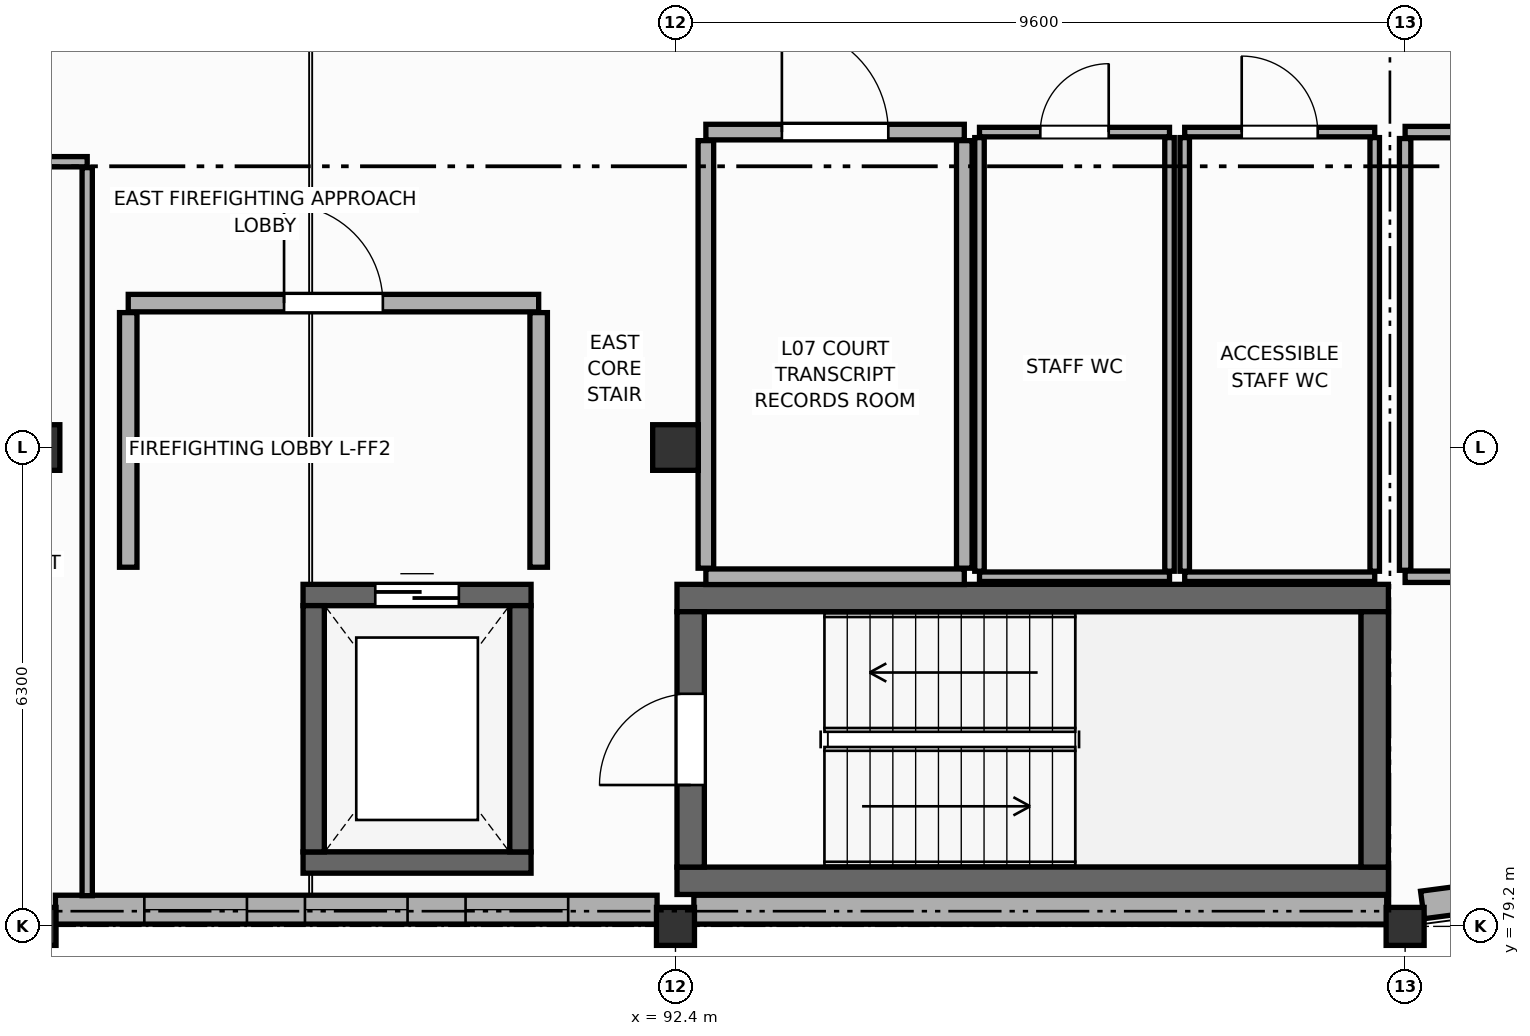
"""IFC4 building model, lengths in metres.
Left out: names, types, materials, properties, quantities, classifications, styles, units other than length and angle.
Written with IfcOpenShell. Run it as: python <this file> out.ifc"""

import sys

from ifc_helpers import new_model, si_unit, direction, frame, frame_2d, origin, origin_2d, place, context, subcontext, project, spatial, rectangle, extrude, element, fill, save


model = new_model("IFC4")
c1 = context("Model", 3, precision=1e-05, world=origin(), true_north=direction((0.0, 1.0)))
c2 = subcontext(c1, "Body", "Model", "MODEL_VIEW")
j1 = project(units=[si_unit("LENGTHUNIT", "METRE"), si_unit("PLANEANGLEUNIT", "RADIAN")], contexts=[c1])
p1 = place(None, origin())
s1 = spatial("IfcSite", under=j1, at=p1, CompositionType="ELEMENT")
p2 = place(p1, origin())
s2 = spatial("IfcBuilding", under=s1, at=p2, CompositionType="ELEMENT")
p3 = place(p2, frame((0.0, 0.0, 27.0)))
s3 = spatial("IfcBuildingStorey", under=s2, at=p3, CompositionType="ELEMENT", Elevation=27.0)
p4 = place(p3, frame((84.0, 79.2, 0.0), z_axis=(0.0, 0.0, 1.0), x_axis=(1.0, 0.0, 0.0)))
e1 = element("IfcColumn", 1, at=p4, inside=s3, PredefinedType="COLUMN", context=c2, shape_type="SweptSolid", body=[
    extrude(rectangle(XDim=0.5, YDim=0.5, at=origin_2d()), origin(), (0.0, 0.0, 1.0), 4.2),
])
p5 = place(p3, frame((84.0, 85.5, 0.0), z_axis=(0.0, 0.0, 1.0), x_axis=(1.0, 0.0, 0.0)))
e2 = element("IfcColumn", 2, at=p5, inside=s3, PredefinedType="COLUMN", context=c2, shape_type="SweptSolid", body=[
    extrude(rectangle(XDim=0.6, YDim=0.6, at=origin_2d()), origin(), (0.0, 0.0, 1.0), 4.2),
])
p6 = place(p3, frame((92.4, 79.2, 0.0), z_axis=(0.0, 0.0, 1.0), x_axis=(1.0, 0.0, 0.0)))
e3 = element("IfcColumn", 3, at=p6, inside=s3, PredefinedType="COLUMN", context=c2, shape_type="SweptSolid", body=[
    extrude(rectangle(XDim=0.5, YDim=0.5, at=origin_2d()), origin(), (0.0, 0.0, 1.0), 4.2),
])
p7 = place(p3, frame((92.4, 85.5, 0.0), z_axis=(0.0, 0.0, 1.0), x_axis=(1.0, 0.0, 0.0)))
e4 = element("IfcColumn", 4, at=p7, inside=s3, PredefinedType="COLUMN", context=c2, shape_type="SweptSolid", body=[
    extrude(rectangle(XDim=0.6, YDim=0.6, at=origin_2d()), origin(), (0.0, 0.0, 1.0), 4.2),
])
p8 = place(p3, frame((102.0, 79.2, 0.0), z_axis=(0.0, 0.0, 1.0), x_axis=(1.0, 0.0, 0.0)))
e5 = element("IfcColumn", 5, at=p8, inside=s3, PredefinedType="COLUMN", context=c2, shape_type="SweptSolid", body=[
    extrude(rectangle(XDim=0.5, YDim=0.5, at=origin_2d()), origin(), (0.0, 0.0, 1.0), 4.2),
])
p9 = place(p3, frame((92.158, 79.42, 0.0), z_axis=(0.0, 0.0, 1.0), x_axis=(-1.0, 0.0, 0.0)))
e6 = element("IfcWall", 6, at=p9, inside=s3, PredefinedType="STANDARD", context=c2, shape_type="SweptSolid", body=[
    extrude(rectangle(XDim=7.916, YDim=0.38, at=frame_2d((3.958, 0.0))), origin(), (0.0, 0.0, 1.0), 3.51),
])
p10 = place(p9, frame((1.17, 0.0, 0.85)))
e7 = element("IfcOpeningElement", 7, at=p10, cuts=e6, PredefinedType="OPENING", context=c2, shape_type="SweptSolid", body=[
    extrude(rectangle(XDim=1.35, YDim=1.95, at=frame_2d((0.675, 0.975))), frame((0.0, 0.2, 0.0), z_axis=(0.0, -1.0, 0.0), x_axis=(1.0, 0.0, 0.0)), (0.0, 0.0, 1.0), 0.4),
])
p11 = place(p9, frame((3.283, 0.0, 0.85)))
e8 = element("IfcOpeningElement", 8, at=p11, cuts=e6, PredefinedType="OPENING", context=c2, shape_type="SweptSolid", body=[
    extrude(rectangle(XDim=1.35, YDim=1.95, at=frame_2d((0.675, 0.975))), frame((0.0, 0.2, 0.0), z_axis=(0.0, -1.0, 0.0), x_axis=(1.0, 0.0, 0.0)), (0.0, 0.0, 1.0), 0.4),
])
p12 = place(p9, frame((5.396, 0.0, 0.85)))
e9 = element("IfcOpeningElement", 9, at=p12, cuts=e6, PredefinedType="OPENING", context=c2, shape_type="SweptSolid", body=[
    extrude(rectangle(XDim=1.35, YDim=1.95, at=frame_2d((0.675, 0.975))), frame((0.0, 0.2, 0.0), z_axis=(0.0, -1.0, 0.0), x_axis=(1.0, 0.0, 0.0)), (0.0, 0.0, 1.0), 0.4),
])
p13 = place(p3, frame((101.758, 79.42, 0.0), z_axis=(0.0, 0.0, 1.0), x_axis=(-1.0, 0.0, 0.0)))
e10 = element("IfcWall", 10, at=p13, inside=s3, PredefinedType="STANDARD", context=c2, shape_type="SweptSolid", body=[
    extrude(rectangle(XDim=9.116, YDim=0.38, at=frame_2d((4.558, 0.0))), origin(), (0.0, 0.0, 1.0), 3.11),
])
p14 = place(p3, frame((102.227, 79.482, 0.0), z_axis=(0.0, 0.0, 1.0), x_axis=(0.991440016295, 0.130562988969, 0.0)))
e11 = element("IfcWall", 11, at=p14, inside=s3, PredefinedType="ELEMENTEDWALL", context=c2, shape_type="SweptSolid", body=[
    extrude(rectangle(XDim=3.027, YDim=0.365, at=frame_2d((1.514, 0.0))), origin(), (0.0, 0.0, 1.0), 3.11),
])
p15 = place(p14, frame((1.128, 0.0, 0.85)))
e12 = element("IfcOpeningElement", 12, at=p15, cuts=e11, PredefinedType="OPENING", context=c2, shape_type="SweptSolid", body=[
    extrude(rectangle(XDim=0.8, YDim=1.7, at=frame_2d((0.4, 0.85))), frame((0.0, 0.192, 0.0), z_axis=(0.0, -1.0, 0.0), x_axis=(1.0, 0.0, 0.0)), (0.0, 0.0, 1.0), 0.385),
])
for number, where, z_axis, x_axis in (
    (13, (92.42, 83.52, 0.0), (0.0, 0.0, 1.0), (1.0, 0.0, 0.0)),
    (14, (101.78, 79.8, 0.0), (0.0, 0.0, 1.0), (-1.0, 0.0, 0.0)),
):
    element("IfcWall", number, at=place(p3, frame(where, z_axis=z_axis, x_axis=x_axis)), inside=s3, PredefinedType="SHEAR", context=c2, shape_type="SweptSolid", body=[
        extrude(rectangle(XDim=9.36, YDim=0.36, at=frame_2d((4.68, 0.0))), origin(), (0.0, 0.0, 1.0), 3.98),
    ])
p16 = place(p3, frame((92.6, 79.98, 0.0), z_axis=(0.0, 0.0, 1.0), x_axis=(0.0, 1.0, 0.0)))
e15 = element("IfcWall", 15, at=p16, inside=s3, PredefinedType="SHEAR", context=c2, shape_type="SweptSolid", body=[
    extrude(rectangle(XDim=3.36, YDim=0.36, at=frame_2d((1.68, 0.0))), origin(), (0.0, 0.0, 1.0), 3.98),
])
p17 = place(p16, frame((1.08, 0.0, 0.0)))
e16 = element("IfcOpeningElement", 16, at=p17, cuts=e15, PredefinedType="OPENING", context=c2, shape_type="SweptSolid", body=[
    extrude(rectangle(XDim=1.2, YDim=2.2, at=frame_2d((0.6, 1.1))), frame((0.0, 0.19, 0.0), z_axis=(0.0, -1.0, 0.0), x_axis=(1.0, 0.0, 0.0)), (0.0, 0.0, 1.0), 0.38),
])
p18 = place(p3, frame((101.6, 83.34, 0.0), z_axis=(0.0, 0.0, 1.0), x_axis=(0.0, -1.0, 0.0)))
e17 = element("IfcWall", 17, at=p18, inside=s3, PredefinedType="SHEAR", context=c2, shape_type="SweptSolid", body=[
    extrude(rectangle(XDim=3.36, YDim=0.36, at=frame_2d((1.68, 0.0))), origin(), (0.0, 0.0, 1.0), 3.98),
])
p19 = place(p3, frame((87.5, 83.56, 0.0), z_axis=(0.0, 0.0, 1.0), x_axis=(1.0, 0.0, 0.0)))
e18 = element("IfcWall", 18, at=p19, inside=s3, PredefinedType="SHEAR", context=c2, shape_type="SweptSolid", body=[
    extrude(rectangle(XDim=3.0, YDim=0.28, at=frame_2d((1.5, 0.0))), origin(), (0.0, 0.0, 1.0), 3.98),
])
p20 = place(p19, frame((0.95, 0.0, 0.0)))
e19 = element("IfcOpeningElement", 19, at=p20, cuts=e18, PredefinedType="OPENING", context=c2, shape_type="SweptSolid", body=[
    extrude(rectangle(XDim=1.1, YDim=2.2, at=frame_2d((0.55, 1.1))), frame((0.0, 0.15, 0.0), z_axis=(0.0, -1.0, 0.0), x_axis=(1.0, 0.0, 0.0)), (0.0, 0.0, 1.0), 0.3),
])
p21 = place(p3, frame((90.5, 80.04, 0.0), z_axis=(0.0, 0.0, 1.0), x_axis=(-1.0, 0.0, 0.0)))
e20 = element("IfcWall", 20, at=p21, inside=s3, PredefinedType="SHEAR", context=c2, shape_type="SweptSolid", body=[
    extrude(rectangle(XDim=3.0, YDim=0.28, at=frame_2d((1.5, 0.0))), origin(), (0.0, 0.0, 1.0), 3.98),
])
for number, where, z_axis, x_axis in (
    (21, (87.64, 80.18, 0.0), (0.0, 0.0, 1.0), (0.0, 1.0, 0.0)),
    (22, (90.36, 83.42, 0.0), (0.0, 0.0, 1.0), (0.0, -1.0, 0.0)),
):
    element("IfcWall", number, at=place(p3, frame(where, z_axis=z_axis, x_axis=x_axis)), inside=s3, PredefinedType="SHEAR", context=c2, shape_type="SweptSolid", body=[
        extrude(rectangle(XDim=3.24, YDim=0.28, at=frame_2d((1.62, 0.0))), origin(), (0.0, 0.0, 1.0), 3.98),
    ])
p22 = place(p3, frame((85.2, 87.4, 0.0), z_axis=(0.0, 0.0, 1.0), x_axis=(1.0, 0.0, 0.0)))
e23 = element("IfcWall", 23, at=p22, inside=s3, PredefinedType="STANDARD", context=c2, shape_type="SweptSolid", body=[
    extrude(rectangle(XDim=5.4, YDim=0.23, at=frame_2d((2.7, 0.0))), origin(), (0.0, 0.0, 1.0), 3.965),
])
p23 = place(p22, frame((2.05, 0.0, 0.0)))
e24 = element("IfcOpeningElement", 24, at=p23, cuts=e23, PredefinedType="OPENING", context=c2, shape_type="SweptSolid", body=[
    extrude(rectangle(XDim=1.3, YDim=2.2, at=frame_2d((0.65, 1.1))), frame((0.0, 0.125, 0.0), z_axis=(0.0, -1.0, 0.0), x_axis=(1.0, 0.0, 0.0)), (0.0, 0.0, 1.0), 0.25),
])
for number, where, z_axis, x_axis in (
    (25, (85.2, 83.925, 0.0), (0.0, 0.0, 1.0), (0.0, 1.0, 0.0)),
    (26, (90.6, 87.275, 0.0), (0.0, 0.0, 1.0), (0.0, -1.0, 0.0)),
):
    element("IfcWall", number, at=place(p3, frame(where, z_axis=z_axis, x_axis=x_axis)), inside=s3, PredefinedType="STANDARD", context=c2, shape_type="SweptSolid", body=[
        extrude(rectangle(XDim=3.35, YDim=0.23, at=frame_2d((1.675, 0.0))), origin(), (0.0, 0.0, 1.0), 3.41),
    ])
p24 = place(p3, frame((96.4, 89.65, 0.0), z_axis=(0.0, 0.0, 1.0), x_axis=(1.0, 0.0, 0.0)))
e27 = element("IfcWall", 27, at=p24, inside=s3, PredefinedType="PARTITIONING", context=c2, shape_type="SweptSolid", body=[
    extrude(rectangle(XDim=2.5, YDim=0.125, at=frame_2d((1.25, 0.0))), origin(), (0.0, 0.0, 1.0), 3.965),
])
p25 = place(p24, frame((0.8, 0.0, 0.0)))
e28 = element("IfcOpeningElement", 28, at=p25, cuts=e27, PredefinedType="OPENING", context=c2, shape_type="SweptSolid", body=[
    extrude(rectangle(XDim=0.9, YDim=2.1, at=frame_2d((0.45, 1.05))), frame((0.0, 0.073, 0.0), z_axis=(0.0, -1.0, 0.0), x_axis=(1.0, 0.0, 0.0)), (0.0, 0.0, 1.0), 0.145),
])
p26 = place(p3, frame((98.9, 83.8, 0.0), z_axis=(0.0, 0.0, 1.0), x_axis=(-1.0, 0.0, 0.0)))
e29 = element("IfcWall", 29, at=p26, inside=s3, PredefinedType="PARTITIONING", context=c2, shape_type="SweptSolid", body=[
    extrude(rectangle(XDim=2.5, YDim=0.125, at=frame_2d((1.25, 0.0))), origin(), (0.0, 0.0, 1.0), 3.965),
])
for number, where, z_axis, x_axis in (
    (30, (96.4, 83.873, 0.0), (0.0, 0.0, 1.0), (0.0, 1.0, 0.0)),
    (31, (98.9, 89.577, 0.0), (0.0, 0.0, 1.0), (0.0, -1.0, 0.0)),
):
    element("IfcWall", number, at=place(p3, frame(where, z_axis=z_axis, x_axis=x_axis)), inside=s3, PredefinedType="PARTITIONING", context=c2, shape_type="SweptSolid", body=[
        extrude(rectangle(XDim=5.705, YDim=0.125, at=frame_2d((2.853, 0.0))), origin(), (0.0, 0.0, 1.0), 3.965),
    ])
p27 = place(p3, frame((99.1, 89.65, 0.0), z_axis=(0.0, 0.0, 1.0), x_axis=(1.0, 0.0, 0.0)))
e32 = element("IfcWall", 32, at=p27, inside=s3, PredefinedType="PARTITIONING", context=c2, shape_type="SweptSolid", body=[
    extrude(rectangle(XDim=2.5, YDim=0.125, at=frame_2d((1.25, 0.0))), origin(), (0.0, 0.0, 1.0), 3.11),
])
p28 = place(p27, frame((0.75, 0.0, 0.0)))
e33 = element("IfcOpeningElement", 33, at=p28, cuts=e32, PredefinedType="OPENING", context=c2, shape_type="SweptSolid", body=[
    extrude(rectangle(XDim=1.0, YDim=2.1, at=frame_2d((0.5, 1.05))), frame((0.0, 0.073, 0.0), z_axis=(0.0, -1.0, 0.0), x_axis=(1.0, 0.0, 0.0)), (0.0, 0.0, 1.0), 0.145),
])
p29 = place(p3, frame((101.6, 83.8, 0.0), z_axis=(0.0, 0.0, 1.0), x_axis=(-1.0, 0.0, 0.0)))
e34 = element("IfcWall", 34, at=p29, inside=s3, PredefinedType="PARTITIONING", context=c2, shape_type="SweptSolid", body=[
    extrude(rectangle(XDim=2.5, YDim=0.125, at=frame_2d((1.25, 0.0))), origin(), (0.0, 0.0, 1.0), 3.11),
])
p30 = place(p3, frame((99.1, 83.873, 0.0), z_axis=(0.0, 0.0, 1.0), x_axis=(0.0, 1.0, 0.0)))
e35 = element("IfcWall", 35, at=p30, inside=s3, PredefinedType="PARTITIONING", context=c2, shape_type="SweptSolid", body=[
    extrude(rectangle(XDim=5.705, YDim=0.125, at=frame_2d((2.853, 0.0))), origin(), (0.0, 0.0, 1.0), 3.965),
])
p31 = place(p3, frame((101.6, 89.577, 0.0), z_axis=(0.0, 0.0, 1.0), x_axis=(0.0, -1.0, 0.0)))
e36 = element("IfcWall", 36, at=p31, inside=s3, PredefinedType="PARTITIONING", context=c2, shape_type="SweptSolid", body=[
    extrude(rectangle(XDim=5.705, YDim=0.125, at=frame_2d((2.853, 0.0))), origin(), (0.0, 0.0, 1.0), 3.11),
])
p32 = place(p3, frame((92.8, 89.65, 0.0), z_axis=(0.0, 0.0, 1.0), x_axis=(1.0, 0.0, 0.0)))
e37 = element("IfcWall", 37, at=p32, inside=s3, PredefinedType="STANDARD", context=c2, shape_type="SweptSolid", body=[
    extrude(rectangle(XDim=3.4, YDim=0.205, at=frame_2d((1.7, 0.0))), origin(), (0.0, 0.0, 1.0), 3.965),
])
p33 = place(p32, frame((1.0, 0.0, 0.0)))
e38 = element("IfcOpeningElement", 38, at=p33, cuts=e37, PredefinedType="OPENING", context=c2, shape_type="SweptSolid", body=[
    extrude(rectangle(XDim=1.4, YDim=2.25, at=frame_2d((0.7, 1.125))), frame((0.0, 0.113, 0.0), z_axis=(0.0, -1.0, 0.0), x_axis=(1.0, 0.0, 0.0)), (0.0, 0.0, 1.0), 0.225),
])
p34 = place(p3, frame((96.2, 83.8, 0.0), z_axis=(0.0, 0.0, 1.0), x_axis=(-1.0, 0.0, 0.0)))
e39 = element("IfcWall", 39, at=p34, inside=s3, PredefinedType="STANDARD", context=c2, shape_type="SweptSolid", body=[
    extrude(rectangle(XDim=3.4, YDim=0.205, at=frame_2d((1.7, 0.0))), origin(), (0.0, 0.0, 1.0), 3.965),
])
for number, where, z_axis, x_axis in (
    (40, (92.8, 83.913, 0.0), (0.0, 0.0, 1.0), (0.0, 1.0, 0.0)),
    (41, (96.2, 89.538, 0.0), (0.0, 0.0, 1.0), (0.0, -1.0, 0.0)),
):
    element("IfcWall", number, at=place(p3, frame(where, z_axis=z_axis, x_axis=x_axis)), inside=s3, PredefinedType="STANDARD", context=c2, shape_type="SweptSolid", body=[
        extrude(rectangle(XDim=5.625, YDim=0.205, at=frame_2d((2.812, 0.0))), origin(), (0.0, 0.0, 1.0), 3.965),
    ])
p35 = place(p3, frame((82.273, 89.26, 0.0), z_axis=(0.0, 0.0, 1.0), x_axis=(1.0, 0.0, 0.0)))
e42 = element("IfcWall", 42, at=p35, inside=s3, PredefinedType="PARTITIONING", context=c2, shape_type="SweptSolid", body=[
    extrude(rectangle(XDim=2.387, YDim=0.135, at=frame_2d((1.193, 0.0))), origin(), (0.0, 0.0, 1.0), 3.51),
])
p36 = place(p35, frame((0.719, 0.0, 0.0)))
e43 = element("IfcOpeningElement", 43, at=p36, cuts=e42, PredefinedType="OPENING", context=c2, shape_type="SweptSolid", body=[
    extrude(rectangle(XDim=0.95, YDim=2.15, at=frame_2d((0.475, 1.075))), frame((0.0, 0.077, 0.0), z_axis=(0.0, -1.0, 0.0), x_axis=(1.0, 0.0, 0.0)), (0.0, 0.0, 1.0), 0.155),
])
p37 = place(p3, frame((84.66, 89.183, 0.0), z_axis=(0.0, 0.0, 1.0), x_axis=(0.0, -1.0, 0.0)))
e44 = element("IfcWall", 44, at=p37, inside=s3, PredefinedType="PARTITIONING", context=c2, shape_type="SweptSolid", body=[
    extrude(rectangle(XDim=9.579, YDim=0.135, at=frame_2d((4.789, 0.0))), origin(), (0.0, 0.0, 1.0), 3.41),
])
p38 = place(p3, frame((102.0, 89.65, 0.0), z_axis=(0.0, 0.0, 1.0), x_axis=(1.0, 0.0, 0.0)))
e45 = element("IfcWall", 45, at=p38, inside=s3, PredefinedType="PARTITIONING", context=c2, shape_type="SweptSolid", body=[
    extrude(rectangle(XDim=9.5, YDim=0.15, at=frame_2d((4.75, 0.0))), origin(), (0.0, 0.0, 1.0), 3.01),
])
p39 = place(p38, frame((1.81, 0.0, 0.0)))
e46 = element("IfcOpeningElement", 46, at=p39, cuts=e45, PredefinedType="OPENING", context=c2, shape_type="SweptSolid", body=[
    extrude(rectangle(XDim=1.5, YDim=2.35, at=frame_2d((0.75, 1.175))), frame((0.0, 0.085, 0.0), z_axis=(0.0, -1.0, 0.0), x_axis=(1.0, 0.0, 0.0)), (0.0, 0.0, 1.0), 0.17),
])
p40 = place(p3, frame((111.5, 83.8, 0.0), z_axis=(0.0, 0.0, 1.0), x_axis=(-1.0, 0.0, 0.0)))
e47 = element("IfcWall", 47, at=p40, inside=s3, PredefinedType="PARTITIONING", context=c2, shape_type="SweptSolid", body=[
    extrude(rectangle(XDim=9.5, YDim=0.15, at=frame_2d((4.75, 0.0))), origin(), (0.0, 0.0, 1.0), 3.01),
])
p41 = place(p3, frame((102.0, 83.885, 0.0), z_axis=(0.0, 0.0, 1.0), x_axis=(0.0, 1.0, 0.0)))
e48 = element("IfcWall", 48, at=p41, inside=s3, PredefinedType="PARTITIONING", context=c2, shape_type="SweptSolid", body=[
    extrude(rectangle(XDim=5.68, YDim=0.15, at=frame_2d((2.84, 0.0))), origin(), (0.0, 0.0, 1.0), 3.11),
])
p42 = place(p10, origin())
e49 = element("IfcWindow", 49, at=p42, inside=s3, PartitioningType="SINGLE_PANEL", PredefinedType="WINDOW", context=c2, shape_type="SweptSolid", body=[
    extrude(rectangle(XDim=1.35, YDim=1.95, at=frame_2d((0.675, 0.975))), frame((0.0, 0.03, 0.0), z_axis=(0.0, -1.0, 0.0), x_axis=(1.0, 0.0, 0.0)), (0.0, 0.0, 1.0), 0.06),
])
fill(e7, e49)
p43 = place(p11, origin())
e50 = element("IfcWindow", 50, at=p43, inside=s3, PartitioningType="SINGLE_PANEL", PredefinedType="WINDOW", context=c2, shape_type="SweptSolid", body=[
    extrude(rectangle(XDim=1.35, YDim=1.95, at=frame_2d((0.675, 0.975))), frame((0.0, 0.03, 0.0), z_axis=(0.0, -1.0, 0.0), x_axis=(1.0, 0.0, 0.0)), (0.0, 0.0, 1.0), 0.06),
])
fill(e8, e50)
p44 = place(p12, origin())
e51 = element("IfcWindow", 51, at=p44, inside=s3, PartitioningType="SINGLE_PANEL", PredefinedType="WINDOW", context=c2, shape_type="SweptSolid", body=[
    extrude(rectangle(XDim=1.35, YDim=1.95, at=frame_2d((0.675, 0.975))), frame((0.0, 0.03, 0.0), z_axis=(0.0, -1.0, 0.0), x_axis=(1.0, 0.0, 0.0)), (0.0, 0.0, 1.0), 0.06),
])
fill(e9, e51)
p45 = place(p17, origin())
e52 = element("IfcDoor", 52, at=p45, inside=s3, OperationType="SINGLE_SWING_LEFT", PredefinedType="DOOR", context=c2, shape_type="SweptSolid", body=[
    extrude(rectangle(XDim=1.2, YDim=2.2, at=frame_2d((0.6, 1.1))), frame((0.0, 0.025, 0.0), z_axis=(0.0, -1.0, 0.0), x_axis=(1.0, 0.0, 0.0)), (0.0, 0.0, 1.0), 0.05),
])
fill(e16, e52)
p46 = place(p20, origin())
e53 = element("IfcDoor", 53, at=p46, inside=s3, OperationType="DOUBLE_DOOR_SLIDING", PredefinedType="DOOR", context=c2, shape_type="SweptSolid", body=[
    extrude(rectangle(XDim=1.1, YDim=2.2, at=frame_2d((0.55, 1.1))), frame((0.0, 0.025, 0.0), z_axis=(0.0, -1.0, 0.0), x_axis=(1.0, 0.0, 0.0)), (0.0, 0.0, 1.0), 0.05),
])
fill(e19, e53)
p47 = place(p23, origin())
e54 = element("IfcDoor", 54, at=p47, inside=s3, OperationType="SINGLE_SWING_LEFT", PredefinedType="DOOR", context=c2, shape_type="SweptSolid", body=[
    extrude(rectangle(XDim=1.3, YDim=2.2, at=frame_2d((0.65, 1.1))), frame((0.0, 0.025, 0.0), z_axis=(0.0, -1.0, 0.0), x_axis=(1.0, 0.0, 0.0)), (0.0, 0.0, 1.0), 0.05),
])
fill(e24, e54)
p48 = place(p25, origin())
e55 = element("IfcDoor", 55, at=p48, inside=s3, OperationType="SINGLE_SWING_RIGHT", PredefinedType="DOOR", context=c2, shape_type="SweptSolid", body=[
    extrude(rectangle(XDim=0.9, YDim=2.1, at=frame_2d((0.45, 1.05))), frame((0.0, 0.025, 0.0), z_axis=(0.0, -1.0, 0.0), x_axis=(1.0, 0.0, 0.0)), (0.0, 0.0, 1.0), 0.05),
])
fill(e28, e55)
p49 = place(p28, origin())
e56 = element("IfcDoor", 56, at=p49, inside=s3, OperationType="SINGLE_SWING_LEFT", PredefinedType="DOOR", context=c2, shape_type="SweptSolid", body=[
    extrude(rectangle(XDim=1.0, YDim=2.1, at=frame_2d((0.5, 1.05))), frame((0.0, 0.025, 0.0), z_axis=(0.0, -1.0, 0.0), x_axis=(1.0, 0.0, 0.0)), (0.0, 0.0, 1.0), 0.05),
])
fill(e33, e56)
p50 = place(p33, origin())
e57 = element("IfcDoor", 57, at=p50, inside=s3, OperationType="SINGLE_SWING_LEFT", PredefinedType="DOOR", context=c2, shape_type="SweptSolid", body=[
    extrude(rectangle(XDim=1.4, YDim=2.25, at=frame_2d((0.7, 1.125))), frame((0.0, 0.025, 0.0), z_axis=(0.0, -1.0, 0.0), x_axis=(1.0, 0.0, 0.0)), (0.0, 0.0, 1.0), 0.05),
])
fill(e38, e57)
save(model, sys.argv[1])
